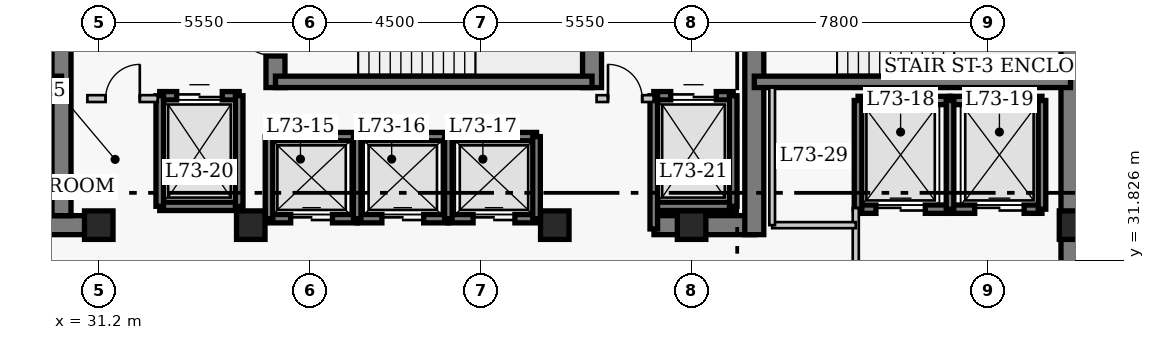
"""IFC4 building model, lengths in metres.
Left out: names, types, materials, properties, quantities, classifications, styles, units other than length and angle.
Written with IfcOpenShell. Run it as: python <this file> out.ifc"""

import sys

from ifc_helpers import new_model, si_unit, direction, frame, frame_2d, origin, origin_2d, place, context, subcontext, project, spatial, rectangle, extrude, element, fill, save


model = new_model("IFC4")
c1 = context("Model", 3, precision=1e-05, world=origin(), true_north=direction((0.0, 1.0)))
c2 = subcontext(c1, "Body", "Model", "MODEL_VIEW")
j1 = project(units=[si_unit("LENGTHUNIT", "METRE"), si_unit("PLANEANGLEUNIT", "RADIAN")], contexts=[c1])
p1 = place(None, origin())
s1 = spatial("IfcSite", under=j1, at=p1, CompositionType="ELEMENT")
p2 = place(p1, origin())
s2 = spatial("IfcBuilding", under=s1, at=p2, CompositionType="ELEMENT")
p3 = place(p2, frame((0.0, 0.0, 293.4)))
s3 = spatial("IfcBuildingStorey", under=s2, at=p3, CompositionType="ELEMENT", Elevation=293.4)
p4 = place(p3, frame((56.77, 27.05, 0.0), z_axis=(0.0, 0.0, 1.0), x_axis=(0.0, 1.0, 0.0)))
e1 = element("IfcWall", 1, at=p4, inside=s3, PredefinedType="SHEAR", context=c2, shape_type="SweptSolid", body=[
    extrude(rectangle(XDim=13.52, YDim=0.5, at=frame_2d((6.76, 0.0))), origin(), (0.0, 0.0, 1.0), 4.0),
])
p5 = place(p3, frame((28.45, 32.75, 0.0), z_axis=(0.0, 0.0, 1.0), x_axis=(1.0, 0.0, 0.0)))
e2 = element("IfcWall", 2, at=p5, inside=s3, PredefinedType="SHEAR", context=c2, shape_type="SweptSolid", body=[
    extrude(rectangle(XDim=2.4, YDim=0.5, at=frame_2d((1.2, 0.0))), origin(), (0.0, 0.0, 1.0), 4.0),
])
p6 = place(p3, frame((45.81, 32.75, 0.0), z_axis=(0.0, 0.0, 1.0), x_axis=(1.0, 0.0, 0.0)))
e3 = element("IfcWall", 3, at=p6, inside=s3, PredefinedType="SHEAR", context=c2, shape_type="SweptSolid", body=[
    extrude(rectangle(XDim=2.64, YDim=0.5, at=frame_2d((1.32, 0.0))), origin(), (0.0, 0.0, 1.0), 4.0),
])
p7 = place(p3, frame((30.22, 33.0, 0.0), z_axis=(0.0, 0.0, 1.0), x_axis=(0.0, 1.0, 0.0)))
e4 = element("IfcWall", 4, at=p7, inside=s3, PredefinedType="SHEAR", context=c2, shape_type="SweptSolid", body=[
    extrude(rectangle(XDim=7.32, YDim=0.5, at=frame_2d((3.66, 0.0))), origin(), (0.0, 0.0, 1.0), 4.0),
])
p8 = place(p3, frame((35.85, 36.37, 0.0), z_axis=(0.0, 0.0, 1.0), x_axis=(0.0, 1.0, 0.0)))
e5 = element("IfcWall", 5, at=p8, inside=s3, PredefinedType="SHEAR", context=c2, shape_type="SweptSolid", body=[
    extrude(rectangle(XDim=3.95, YDim=0.5, at=frame_2d((1.975, 0.0))), origin(), (0.0, 0.0, 1.0), 4.0),
])
p9 = place(p8, frame((0.83, 0.0, 0.0)))
e6 = element("IfcOpeningElement", 6, at=p9, cuts=e5, PredefinedType="OPENING", context=c2, shape_type="SweptSolid", body=[
    extrude(rectangle(XDim=1.2, YDim=2.15, at=frame_2d((0.6, 1.075))), frame((0.0, 0.26, 0.0), z_axis=(0.0, -1.0, 0.0), x_axis=(1.0, 0.0, 0.0)), (0.0, 0.0, 1.0), 0.52),
])
p10 = place(p3, frame((44.18, 36.37, 0.0), z_axis=(0.0, 0.0, 1.0), x_axis=(0.0, 1.0, 0.0)))
e7 = element("IfcWall", 7, at=p10, inside=s3, PredefinedType="SHEAR", context=c2, shape_type="SweptSolid", body=[
    extrude(rectangle(XDim=3.95, YDim=0.5, at=frame_2d((1.975, 0.0))), origin(), (0.0, 0.0, 1.0), 4.0),
])
p11 = place(p3, frame((48.45, 32.5, 0.0), z_axis=(0.0, 0.0, 1.0), x_axis=(0.0, 1.0, 0.0)))
e8 = element("IfcWall", 8, at=p11, inside=s3, PredefinedType="SHEAR", context=c2, shape_type="SweptSolid", body=[
    extrude(rectangle(XDim=7.82, YDim=0.5, at=frame_2d((3.91, 0.0))), origin(), (0.0, 0.0, 1.0), 4.0),
])
p12 = place(p11, frame((5.65, 0.0, 0.0)))
e9 = element("IfcOpeningElement", 9, at=p12, cuts=e8, PredefinedType="OPENING", context=c2, shape_type="SweptSolid", body=[
    extrude(rectangle(XDim=1.2, YDim=2.15, at=frame_2d((0.6, 1.075))), frame((0.0, 0.26, 0.0), z_axis=(0.0, -1.0, 0.0), x_axis=(1.0, 0.0, 0.0)), (0.0, 0.0, 1.0), 0.52),
])
p13 = place(p3, frame((21.9, 36.52, 0.0), z_axis=(0.0, 0.0, 1.0), x_axis=(1.0, 0.0, 0.0)))
e10 = element("IfcWall", 10, at=p13, inside=s3, PredefinedType="SHEAR", context=c2, shape_type="SweptSolid", body=[
    extrude(rectangle(XDim=8.32, YDim=0.3, at=frame_2d((4.16, 0.0))), origin(), (0.0, 0.0, 1.0), 4.0),
])
p14 = place(p13, frame((0.85, 0.0, 0.0)))
e11 = element("IfcOpeningElement", 11, at=p14, cuts=e10, PredefinedType="OPENING", context=c2, shape_type="SweptSolid", body=[
    extrude(rectangle(XDim=1.2, YDim=2.15, at=frame_2d((0.6, 1.075))), frame((0.0, 0.16, 0.0), z_axis=(0.0, -1.0, 0.0), x_axis=(1.0, 0.0, 0.0)), (0.0, 0.0, 1.0), 0.32),
])
p15 = place(p3, frame((35.85, 36.52, 0.0), z_axis=(0.0, 0.0, 1.0), x_axis=(1.0, 0.0, 0.0)))
e12 = element("IfcWall", 12, at=p15, inside=s3, PredefinedType="SHEAR", context=c2, shape_type="SweptSolid", body=[
    extrude(rectangle(XDim=8.33, YDim=0.3, at=frame_2d((4.165, 0.0))), origin(), (0.0, 0.0, 1.0), 4.0),
])
p16 = place(p3, frame((48.45, 36.52, 0.0), z_axis=(0.0, 0.0, 1.0), x_axis=(1.0, 0.0, 0.0)))
e13 = element("IfcWall", 13, at=p16, inside=s3, PredefinedType="SHEAR", context=c2, shape_type="SweptSolid", body=[
    extrude(rectangle(XDim=8.32, YDim=0.3, at=frame_2d((4.16, 0.0))), origin(), (0.0, 0.0, 1.0), 4.0),
])
for number, where, z_axis, x_axis in (
    (14, (31.2, 32.75, 0.0), (0.0, 0.0, 1.0), (1.0, 0.0, 0.0)),
    (15, (35.2, 32.75, 0.0), (0.0, 0.0, 1.0), (1.0, 0.0, 0.0)),
    (16, (43.2, 32.75, 0.0), (0.0, 0.0, 1.0), (1.0, 0.0, 0.0)),
    (17, (46.8, 32.75, 0.0), (0.0, 0.0, 1.0), (1.0, 0.0, 0.0)),
    (18, (56.85, 32.75, 0.0), (0.0, 0.0, 1.0), (1.0, 0.0, 0.0)),
):
    element("IfcColumn", number, at=place(p3, frame(where, z_axis=z_axis, x_axis=x_axis)), inside=s3, PredefinedType="COLUMN", context=c2, shape_type="SweptSolid", body=[
        extrude(rectangle(XDim=0.75, YDim=0.75, at=origin_2d()), origin(), (0.0, 0.0, 1.0), 4.0),
    ])
p17 = place(p3, frame((35.68, 35.08, 0.0), z_axis=(0.0, 0.0, 1.0), x_axis=(1.0, 0.0, 0.0)))
e19 = element("IfcWall", 19, at=p17, inside=s3, PredefinedType="SHEAR", context=c2, shape_type="SweptSolid", body=[
    extrude(rectangle(XDim=2.32, YDim=0.22, at=frame_2d((1.16, 0.0))), origin(), (0.0, 0.0, 1.0), 4.0),
])
p18 = place(p3, frame((35.68, 32.92, 0.0), z_axis=(0.0, 0.0, 1.0), x_axis=(1.0, 0.0, 0.0)))
e20 = element("IfcWall", 20, at=p18, inside=s3, PredefinedType="SHEAR", context=c2, shape_type="SweptSolid", body=[
    extrude(rectangle(XDim=2.32, YDim=0.22, at=frame_2d((1.16, 0.0))), origin(), (0.0, 0.0, 1.0), 4.0),
])
p19 = place(p18, frame((0.57, 0.0, 0.0)))
e21 = element("IfcOpeningElement", 21, at=p19, cuts=e20, PredefinedType="OPENING", context=c2, shape_type="SweptSolid", body=[
    extrude(rectangle(XDim=1.1, YDim=2.15, at=frame_2d((0.55, 1.075))), frame((0.0, 0.12, 0.0), z_axis=(0.0, -1.0, 0.0), x_axis=(1.0, 0.0, 0.0)), (0.0, 0.0, 1.0), 0.24),
])
p20 = place(p3, frame((35.68, 32.92, 0.0), z_axis=(0.0, 0.0, 1.0), x_axis=(0.0, 1.0, 0.0)))
e22 = element("IfcWall", 22, at=p20, inside=s3, PredefinedType="SHEAR", context=c2, shape_type="SweptSolid", body=[
    extrude(rectangle(XDim=2.16, YDim=0.2, at=frame_2d((1.08, 0.0))), origin(), (0.0, 0.0, 1.0), 4.0),
])
p21 = place(p3, frame((38.0, 35.08, 0.0), z_axis=(0.0, 0.0, 1.0), x_axis=(1.0, 0.0, 0.0)))
e23 = element("IfcWall", 23, at=p21, inside=s3, PredefinedType="SHEAR", context=c2, shape_type="SweptSolid", body=[
    extrude(rectangle(XDim=2.4, YDim=0.22, at=frame_2d((1.2, 0.0))), origin(), (0.0, 0.0, 1.0), 4.0),
])
p22 = place(p3, frame((38.0, 32.92, 0.0), z_axis=(0.0, 0.0, 1.0), x_axis=(1.0, 0.0, 0.0)))
e24 = element("IfcWall", 24, at=p22, inside=s3, PredefinedType="SHEAR", context=c2, shape_type="SweptSolid", body=[
    extrude(rectangle(XDim=2.4, YDim=0.22, at=frame_2d((1.2, 0.0))), origin(), (0.0, 0.0, 1.0), 4.0),
])
p23 = place(p22, frame((0.65, 0.0, 0.0)))
e25 = element("IfcOpeningElement", 25, at=p23, cuts=e24, PredefinedType="OPENING", context=c2, shape_type="SweptSolid", body=[
    extrude(rectangle(XDim=1.1, YDim=2.15, at=frame_2d((0.55, 1.075))), frame((0.0, 0.12, 0.0), z_axis=(0.0, -1.0, 0.0), x_axis=(1.0, 0.0, 0.0)), (0.0, 0.0, 1.0), 0.24),
])
p24 = place(p3, frame((38.0, 32.92, 0.0), z_axis=(0.0, 0.0, 1.0), x_axis=(0.0, 1.0, 0.0)))
e26 = element("IfcWall", 26, at=p24, inside=s3, PredefinedType="SHEAR", context=c2, shape_type="SweptSolid", body=[
    extrude(rectangle(XDim=2.16, YDim=0.2, at=frame_2d((1.08, 0.0))), origin(), (0.0, 0.0, 1.0), 4.0),
])
p25 = place(p3, frame((40.4, 35.08, 0.0), z_axis=(0.0, 0.0, 1.0), x_axis=(1.0, 0.0, 0.0)))
e27 = element("IfcWall", 27, at=p25, inside=s3, PredefinedType="SHEAR", context=c2, shape_type="SweptSolid", body=[
    extrude(rectangle(XDim=2.32, YDim=0.22, at=frame_2d((1.16, 0.0))), origin(), (0.0, 0.0, 1.0), 4.0),
])
p26 = place(p3, frame((40.4, 32.92, 0.0), z_axis=(0.0, 0.0, 1.0), x_axis=(1.0, 0.0, 0.0)))
e28 = element("IfcWall", 28, at=p26, inside=s3, PredefinedType="SHEAR", context=c2, shape_type="SweptSolid", body=[
    extrude(rectangle(XDim=2.32, YDim=0.22, at=frame_2d((1.16, 0.0))), origin(), (0.0, 0.0, 1.0), 4.0),
])
p27 = place(p26, frame((0.65, 0.0, 0.0)))
e29 = element("IfcOpeningElement", 29, at=p27, cuts=e28, PredefinedType="OPENING", context=c2, shape_type="SweptSolid", body=[
    extrude(rectangle(XDim=1.1, YDim=2.15, at=frame_2d((0.55, 1.075))), frame((0.0, 0.12, 0.0), z_axis=(0.0, -1.0, 0.0), x_axis=(1.0, 0.0, 0.0)), (0.0, 0.0, 1.0), 0.24),
])
for number, where, z_axis, x_axis in (
    (30, (40.4, 32.92, 0.0), (0.0, 0.0, 1.0), (0.0, 1.0, 0.0)),
    (31, (42.72, 32.92, 0.0), (0.0, 0.0, 1.0), (0.0, 1.0, 0.0)),
):
    element("IfcWall", number, at=place(p3, frame(where, z_axis=z_axis, x_axis=x_axis)), inside=s3, PredefinedType="SHEAR", context=c2, shape_type="SweptSolid", body=[
        extrude(rectangle(XDim=2.16, YDim=0.2, at=frame_2d((1.08, 0.0))), origin(), (0.0, 0.0, 1.0), 4.0),
    ])
p28 = place(p3, frame((51.18, 36.03, 0.0), z_axis=(0.0, 0.0, 1.0), x_axis=(1.0, 0.0, 0.0)))
e32 = element("IfcWall", 32, at=p28, inside=s3, PredefinedType="SHEAR", context=c2, shape_type="SweptSolid", body=[
    extrude(rectangle(XDim=2.42, YDim=0.22, at=frame_2d((1.21, 0.0))), origin(), (0.0, 0.0, 1.0), 4.0),
])
p29 = place(p3, frame((51.18, 33.17, 0.0), z_axis=(0.0, 0.0, 1.0), x_axis=(1.0, 0.0, 0.0)))
e33 = element("IfcWall", 33, at=p29, inside=s3, PredefinedType="SHEAR", context=c2, shape_type="SweptSolid", body=[
    extrude(rectangle(XDim=2.42, YDim=0.22, at=frame_2d((1.21, 0.0))), origin(), (0.0, 0.0, 1.0), 4.0),
])
p30 = place(p29, frame((0.47, 0.0, 0.0)))
e34 = element("IfcOpeningElement", 34, at=p30, cuts=e33, PredefinedType="OPENING", context=c2, shape_type="SweptSolid", body=[
    extrude(rectangle(XDim=1.3, YDim=2.15, at=frame_2d((0.65, 1.075))), frame((0.0, 0.12, 0.0), z_axis=(0.0, -1.0, 0.0), x_axis=(1.0, 0.0, 0.0)), (0.0, 0.0, 1.0), 0.24),
])
p31 = place(p3, frame((51.18, 33.17, 0.0), z_axis=(0.0, 0.0, 1.0), x_axis=(0.0, 1.0, 0.0)))
e35 = element("IfcWall", 35, at=p31, inside=s3, PredefinedType="SHEAR", context=c2, shape_type="SweptSolid", body=[
    extrude(rectangle(XDim=2.86, YDim=0.2, at=frame_2d((1.43, 0.0))), origin(), (0.0, 0.0, 1.0), 4.0),
])
p32 = place(p3, frame((53.6, 36.03, 0.0), z_axis=(0.0, 0.0, 1.0), x_axis=(1.0, 0.0, 0.0)))
e36 = element("IfcWall", 36, at=p32, inside=s3, PredefinedType="SHEAR", context=c2, shape_type="SweptSolid", body=[
    extrude(rectangle(XDim=2.42, YDim=0.22, at=frame_2d((1.21, 0.0))), origin(), (0.0, 0.0, 1.0), 4.0),
])
p33 = place(p3, frame((53.6, 33.17, 0.0), z_axis=(0.0, 0.0, 1.0), x_axis=(1.0, 0.0, 0.0)))
e37 = element("IfcWall", 37, at=p33, inside=s3, PredefinedType="SHEAR", context=c2, shape_type="SweptSolid", body=[
    extrude(rectangle(XDim=2.42, YDim=0.22, at=frame_2d((1.21, 0.0))), origin(), (0.0, 0.0, 1.0), 4.0),
])
p34 = place(p33, frame((0.65, 0.0, 0.0)))
e38 = element("IfcOpeningElement", 38, at=p34, cuts=e37, PredefinedType="OPENING", context=c2, shape_type="SweptSolid", body=[
    extrude(rectangle(XDim=1.3, YDim=2.15, at=frame_2d((0.65, 1.075))), frame((0.0, 0.12, 0.0), z_axis=(0.0, -1.0, 0.0), x_axis=(1.0, 0.0, 0.0)), (0.0, 0.0, 1.0), 0.24),
])
for number, where, z_axis, x_axis in (
    (39, (53.6, 33.17, 0.0), (0.0, 0.0, 1.0), (0.0, 1.0, 0.0)),
    (40, (56.02, 33.17, 0.0), (0.0, 0.0, 1.0), (0.0, 1.0, 0.0)),
):
    element("IfcWall", number, at=place(p3, frame(where, z_axis=z_axis, x_axis=x_axis)), inside=s3, PredefinedType="SHEAR", context=c2, shape_type="SweptSolid", body=[
        extrude(rectangle(XDim=2.86, YDim=0.2, at=frame_2d((1.43, 0.0))), origin(), (0.0, 0.0, 1.0), 4.0),
    ])
p35 = place(p3, frame((32.805, 36.155, 0.0), z_axis=(0.0, 0.0, 1.0), x_axis=(1.0, 0.0, 0.0)))
e41 = element("IfcWall", 41, at=p35, inside=s3, PredefinedType="SHEAR", context=c2, shape_type="SweptSolid", body=[
    extrude(rectangle(XDim=2.09, YDim=0.22, at=frame_2d((1.045, 0.0))), origin(), (0.0, 0.0, 1.0), 4.0),
])
p36 = place(p35, frame((0.445, 0.0, 0.0)))
e42 = element("IfcOpeningElement", 42, at=p36, cuts=e41, PredefinedType="OPENING", context=c2, shape_type="SweptSolid", body=[
    extrude(rectangle(XDim=1.2, YDim=2.15, at=frame_2d((0.6, 1.075))), frame((0.0, 0.12, 0.0), z_axis=(0.0, -1.0, 0.0), x_axis=(1.0, 0.0, 0.0)), (0.0, 0.0, 1.0), 0.24),
])
p37 = place(p3, frame((32.805, 33.245, 0.0), z_axis=(0.0, 0.0, 1.0), x_axis=(1.0, 0.0, 0.0)))
e43 = element("IfcWall", 43, at=p37, inside=s3, PredefinedType="SHEAR", context=c2, shape_type="SweptSolid", body=[
    extrude(rectangle(XDim=2.09, YDim=0.22, at=frame_2d((1.045, 0.0))), origin(), (0.0, 0.0, 1.0), 4.0),
])
for number, where, z_axis, x_axis in (
    (44, (32.805, 33.245, 0.0), (0.0, 0.0, 1.0), (0.0, 1.0, 0.0)),
    (45, (34.895, 33.245, 0.0), (0.0, 0.0, 1.0), (0.0, 1.0, 0.0)),
):
    element("IfcWall", number, at=place(p3, frame(where, z_axis=z_axis, x_axis=x_axis)), inside=s3, PredefinedType="SHEAR", context=c2, shape_type="SweptSolid", body=[
        extrude(rectangle(XDim=2.91, YDim=0.2, at=frame_2d((1.455, 0.0))), origin(), (0.0, 0.0, 1.0), 4.0),
    ])
p38 = place(p3, frame((45.805, 36.155, 0.0), z_axis=(0.0, 0.0, 1.0), x_axis=(1.0, 0.0, 0.0)))
e46 = element("IfcWall", 46, at=p38, inside=s3, PredefinedType="SHEAR", context=c2, shape_type="SweptSolid", body=[
    extrude(rectangle(XDim=2.09, YDim=0.22, at=frame_2d((1.045, 0.0))), origin(), (0.0, 0.0, 1.0), 4.0),
])
p39 = place(p38, frame((0.445, 0.0, 0.0)))
e47 = element("IfcOpeningElement", 47, at=p39, cuts=e46, PredefinedType="OPENING", context=c2, shape_type="SweptSolid", body=[
    extrude(rectangle(XDim=1.2, YDim=2.15, at=frame_2d((0.6, 1.075))), frame((0.0, 0.12, 0.0), z_axis=(0.0, -1.0, 0.0), x_axis=(1.0, 0.0, 0.0)), (0.0, 0.0, 1.0), 0.24),
])
p40 = place(p3, frame((45.805, 33.245, 0.0), z_axis=(0.0, 0.0, 1.0), x_axis=(1.0, 0.0, 0.0)))
e48 = element("IfcWall", 48, at=p40, inside=s3, PredefinedType="SHEAR", context=c2, shape_type="SweptSolid", body=[
    extrude(rectangle(XDim=2.09, YDim=0.22, at=frame_2d((1.045, 0.0))), origin(), (0.0, 0.0, 1.0), 4.0),
])
p41 = place(p3, frame((45.805, 32.65, 0.0), z_axis=(0.0, 0.0, 1.0), x_axis=(0.0, 1.0, 0.0)))
e49 = element("IfcWall", 49, at=p41, inside=s3, PredefinedType="SHEAR", context=c2, shape_type="SweptSolid", body=[
    extrude(rectangle(XDim=3.505, YDim=0.2, at=frame_2d((1.752, 0.0))), origin(), (0.0, 0.0, 1.0), 4.0),
])
p42 = place(p3, frame((47.895, 33.245, 0.0), z_axis=(0.0, 0.0, 1.0), x_axis=(0.0, 1.0, 0.0)))
e50 = element("IfcWall", 50, at=p42, inside=s3, PredefinedType="SHEAR", context=c2, shape_type="SweptSolid", body=[
    extrude(rectangle(XDim=2.91, YDim=0.2, at=frame_2d((1.455, 0.0))), origin(), (0.0, 0.0, 1.0), 4.0),
])
p43 = place(p3, frame((30.9, 36.08, 0.0), z_axis=(0.0, 0.0, 1.0), x_axis=(1.0, 0.0, 0.0)))
e51 = element("IfcWall", 51, at=p43, inside=s3, PredefinedType="PARTITIONING", context=c2, shape_type="SweptSolid", body=[
    extrude(rectangle(XDim=1.85, YDim=0.18, at=frame_2d((0.925, 0.0))), origin(), (0.0, 0.0, 1.0), 3.71),
])
p44 = place(p43, frame((0.48, 0.0, 0.0)))
e52 = element("IfcOpeningElement", 52, at=p44, cuts=e51, PredefinedType="OPENING", context=c2, shape_type="SweptSolid", body=[
    extrude(rectangle(XDim=0.9, YDim=2.15, at=frame_2d((0.45, 1.075))), frame((0.0, 0.1, 0.0), z_axis=(0.0, -1.0, 0.0), x_axis=(1.0, 0.0, 0.0)), (0.0, 0.0, 1.0), 0.2),
])
p45 = place(p3, frame((44.3, 36.08, 0.0), z_axis=(0.0, 0.0, 1.0), x_axis=(1.0, 0.0, 0.0)))
e53 = element("IfcWall", 53, at=p45, inside=s3, PredefinedType="PARTITIONING", context=c2, shape_type="SweptSolid", body=[
    extrude(rectangle(XDim=1.5, YDim=0.18, at=frame_2d((0.75, 0.0))), origin(), (0.0, 0.0, 1.0), 3.71),
])
p46 = place(p45, frame((0.3, 0.0, 0.0)))
e54 = element("IfcOpeningElement", 54, at=p46, cuts=e53, PredefinedType="OPENING", context=c2, shape_type="SweptSolid", body=[
    extrude(rectangle(XDim=0.9, YDim=2.15, at=frame_2d((0.45, 1.075))), frame((0.0, 0.1, 0.0), z_axis=(0.0, -1.0, 0.0), x_axis=(1.0, 0.0, 0.0)), (0.0, 0.0, 1.0), 0.2),
])
p47 = place(p3, frame((51.12, 29.5, 0.0), z_axis=(0.0, 0.0, 1.0), x_axis=(0.0, 1.0, 0.0)))
e55 = element("IfcWall", 55, at=p47, inside=s3, PredefinedType="PARTITIONING", context=c2, shape_type="SweptSolid", body=[
    extrude(rectangle(XDim=3.7, YDim=0.16, at=frame_2d((1.85, 0.0))), origin(), (0.0, 0.0, 1.0), 3.71),
])
p48 = place(p47, frame((0.9, 0.0, 0.0)))
e56 = element("IfcOpeningElement", 56, at=p48, cuts=e55, PredefinedType="OPENING", context=c2, shape_type="SweptSolid", body=[
    extrude(rectangle(XDim=1.1, YDim=2.15, at=frame_2d((0.55, 1.075))), frame((0.0, 0.09, 0.0), z_axis=(0.0, -1.0, 0.0), x_axis=(1.0, 0.0, 0.0)), (0.0, 0.0, 1.0), 0.18),
])
p49 = place(p3, frame((48.92, 32.75, 0.0), z_axis=(0.0, 0.0, 1.0), x_axis=(1.0, 0.0, 0.0)))
e57 = element("IfcWall", 57, at=p49, inside=s3, PredefinedType="PARTITIONING", context=c2, shape_type="SweptSolid", body=[
    extrude(rectangle(XDim=2.2, YDim=0.16, at=frame_2d((1.1, 0.0))), origin(), (0.0, 0.0, 1.0), 3.71),
])
p50 = place(p3, frame((48.92, 32.75, 0.0), z_axis=(0.0, 0.0, 1.0), x_axis=(0.0, 1.0, 0.0)))
e58 = element("IfcWall", 58, at=p50, inside=s3, PredefinedType="PARTITIONING", context=c2, shape_type="SweptSolid", body=[
    extrude(rectangle(XDim=3.62, YDim=0.15, at=frame_2d((1.81, 0.0))), origin(), (0.0, 0.0, 1.0), 3.71),
])
p51 = place(p19, origin())
e59 = element("IfcDoor", 59, at=p51, inside=s3, OperationType="DOUBLE_DOOR_SLIDING", PredefinedType="DOOR", context=c2, shape_type="SweptSolid", body=[
    extrude(rectangle(XDim=1.1, YDim=2.15, at=frame_2d((0.55, 1.075))), frame((0.0, 0.025, 0.0), z_axis=(0.0, -1.0, 0.0), x_axis=(1.0, 0.0, 0.0)), (0.0, 0.0, 1.0), 0.05),
])
fill(e21, e59)
p52 = place(p23, origin())
e60 = element("IfcDoor", 60, at=p52, inside=s3, OperationType="DOUBLE_DOOR_SLIDING", PredefinedType="DOOR", context=c2, shape_type="SweptSolid", body=[
    extrude(rectangle(XDim=1.1, YDim=2.15, at=frame_2d((0.55, 1.075))), frame((0.0, 0.025, 0.0), z_axis=(0.0, -1.0, 0.0), x_axis=(1.0, 0.0, 0.0)), (0.0, 0.0, 1.0), 0.05),
])
fill(e25, e60)
p53 = place(p27, origin())
e61 = element("IfcDoor", 61, at=p53, inside=s3, OperationType="DOUBLE_DOOR_SLIDING", PredefinedType="DOOR", context=c2, shape_type="SweptSolid", body=[
    extrude(rectangle(XDim=1.1, YDim=2.15, at=frame_2d((0.55, 1.075))), frame((0.0, 0.025, 0.0), z_axis=(0.0, -1.0, 0.0), x_axis=(1.0, 0.0, 0.0)), (0.0, 0.0, 1.0), 0.05),
])
fill(e29, e61)
p54 = place(p30, origin())
e62 = element("IfcDoor", 62, at=p54, inside=s3, OperationType="DOUBLE_DOOR_SLIDING", PredefinedType="DOOR", context=c2, shape_type="SweptSolid", body=[
    extrude(rectangle(XDim=1.3, YDim=2.15, at=frame_2d((0.65, 1.075))), frame((0.0, 0.025, 0.0), z_axis=(0.0, -1.0, 0.0), x_axis=(1.0, 0.0, 0.0)), (0.0, 0.0, 1.0), 0.05),
])
fill(e34, e62)
p55 = place(p34, origin())
e63 = element("IfcDoor", 63, at=p55, inside=s3, OperationType="DOUBLE_DOOR_SLIDING", PredefinedType="DOOR", context=c2, shape_type="SweptSolid", body=[
    extrude(rectangle(XDim=1.3, YDim=2.15, at=frame_2d((0.65, 1.075))), frame((0.0, 0.025, 0.0), z_axis=(0.0, -1.0, 0.0), x_axis=(1.0, 0.0, 0.0)), (0.0, 0.0, 1.0), 0.05),
])
fill(e38, e63)
p56 = place(p36, origin())
e64 = element("IfcDoor", 64, at=p56, inside=s3, OperationType="DOUBLE_DOOR_SLIDING", PredefinedType="DOOR", context=c2, shape_type="SweptSolid", body=[
    extrude(rectangle(XDim=1.2, YDim=2.15, at=frame_2d((0.6, 1.075))), frame((0.0, 0.025, 0.0), z_axis=(0.0, -1.0, 0.0), x_axis=(1.0, 0.0, 0.0)), (0.0, 0.0, 1.0), 0.05),
])
fill(e42, e64)
p57 = place(p39, origin())
e65 = element("IfcDoor", 65, at=p57, inside=s3, OperationType="DOUBLE_DOOR_SLIDING", PredefinedType="DOOR", context=c2, shape_type="SweptSolid", body=[
    extrude(rectangle(XDim=1.2, YDim=2.15, at=frame_2d((0.6, 1.075))), frame((0.0, 0.025, 0.0), z_axis=(0.0, -1.0, 0.0), x_axis=(1.0, 0.0, 0.0)), (0.0, 0.0, 1.0), 0.05),
])
fill(e47, e65)
p58 = place(p44, origin())
e66 = element("IfcDoor", 66, at=p58, inside=s3, OperationType="SINGLE_SWING_RIGHT", PredefinedType="DOOR", context=c2, shape_type="SweptSolid", body=[
    extrude(rectangle(XDim=0.9, YDim=2.15, at=frame_2d((0.45, 1.075))), frame((0.0, 0.025, 0.0), z_axis=(0.0, -1.0, 0.0), x_axis=(1.0, 0.0, 0.0)), (0.0, 0.0, 1.0), 0.05),
])
fill(e52, e66)
p59 = place(p46, origin())
e67 = element("IfcDoor", 67, at=p59, inside=s3, OperationType="SINGLE_SWING_LEFT", PredefinedType="DOOR", context=c2, shape_type="SweptSolid", body=[
    extrude(rectangle(XDim=0.9, YDim=2.15, at=frame_2d((0.45, 1.075))), frame((0.0, 0.025, 0.0), z_axis=(0.0, -1.0, 0.0), x_axis=(1.0, 0.0, 0.0)), (0.0, 0.0, 1.0), 0.05),
])
fill(e54, e67)
p60 = place(p9, origin())
e68 = element("IfcDoor", 68, at=p60, inside=s3, OperationType="SINGLE_SWING_RIGHT", PredefinedType="DOOR", context=c2, shape_type="SweptSolid", body=[
    extrude(rectangle(XDim=1.2, YDim=2.15, at=frame_2d((0.6, 1.075))), frame((0.0, 0.025, 0.0), z_axis=(0.0, -1.0, 0.0), x_axis=(1.0, 0.0, 0.0)), (0.0, 0.0, 1.0), 0.05),
])
fill(e6, e68)
save(model, sys.argv[1])
